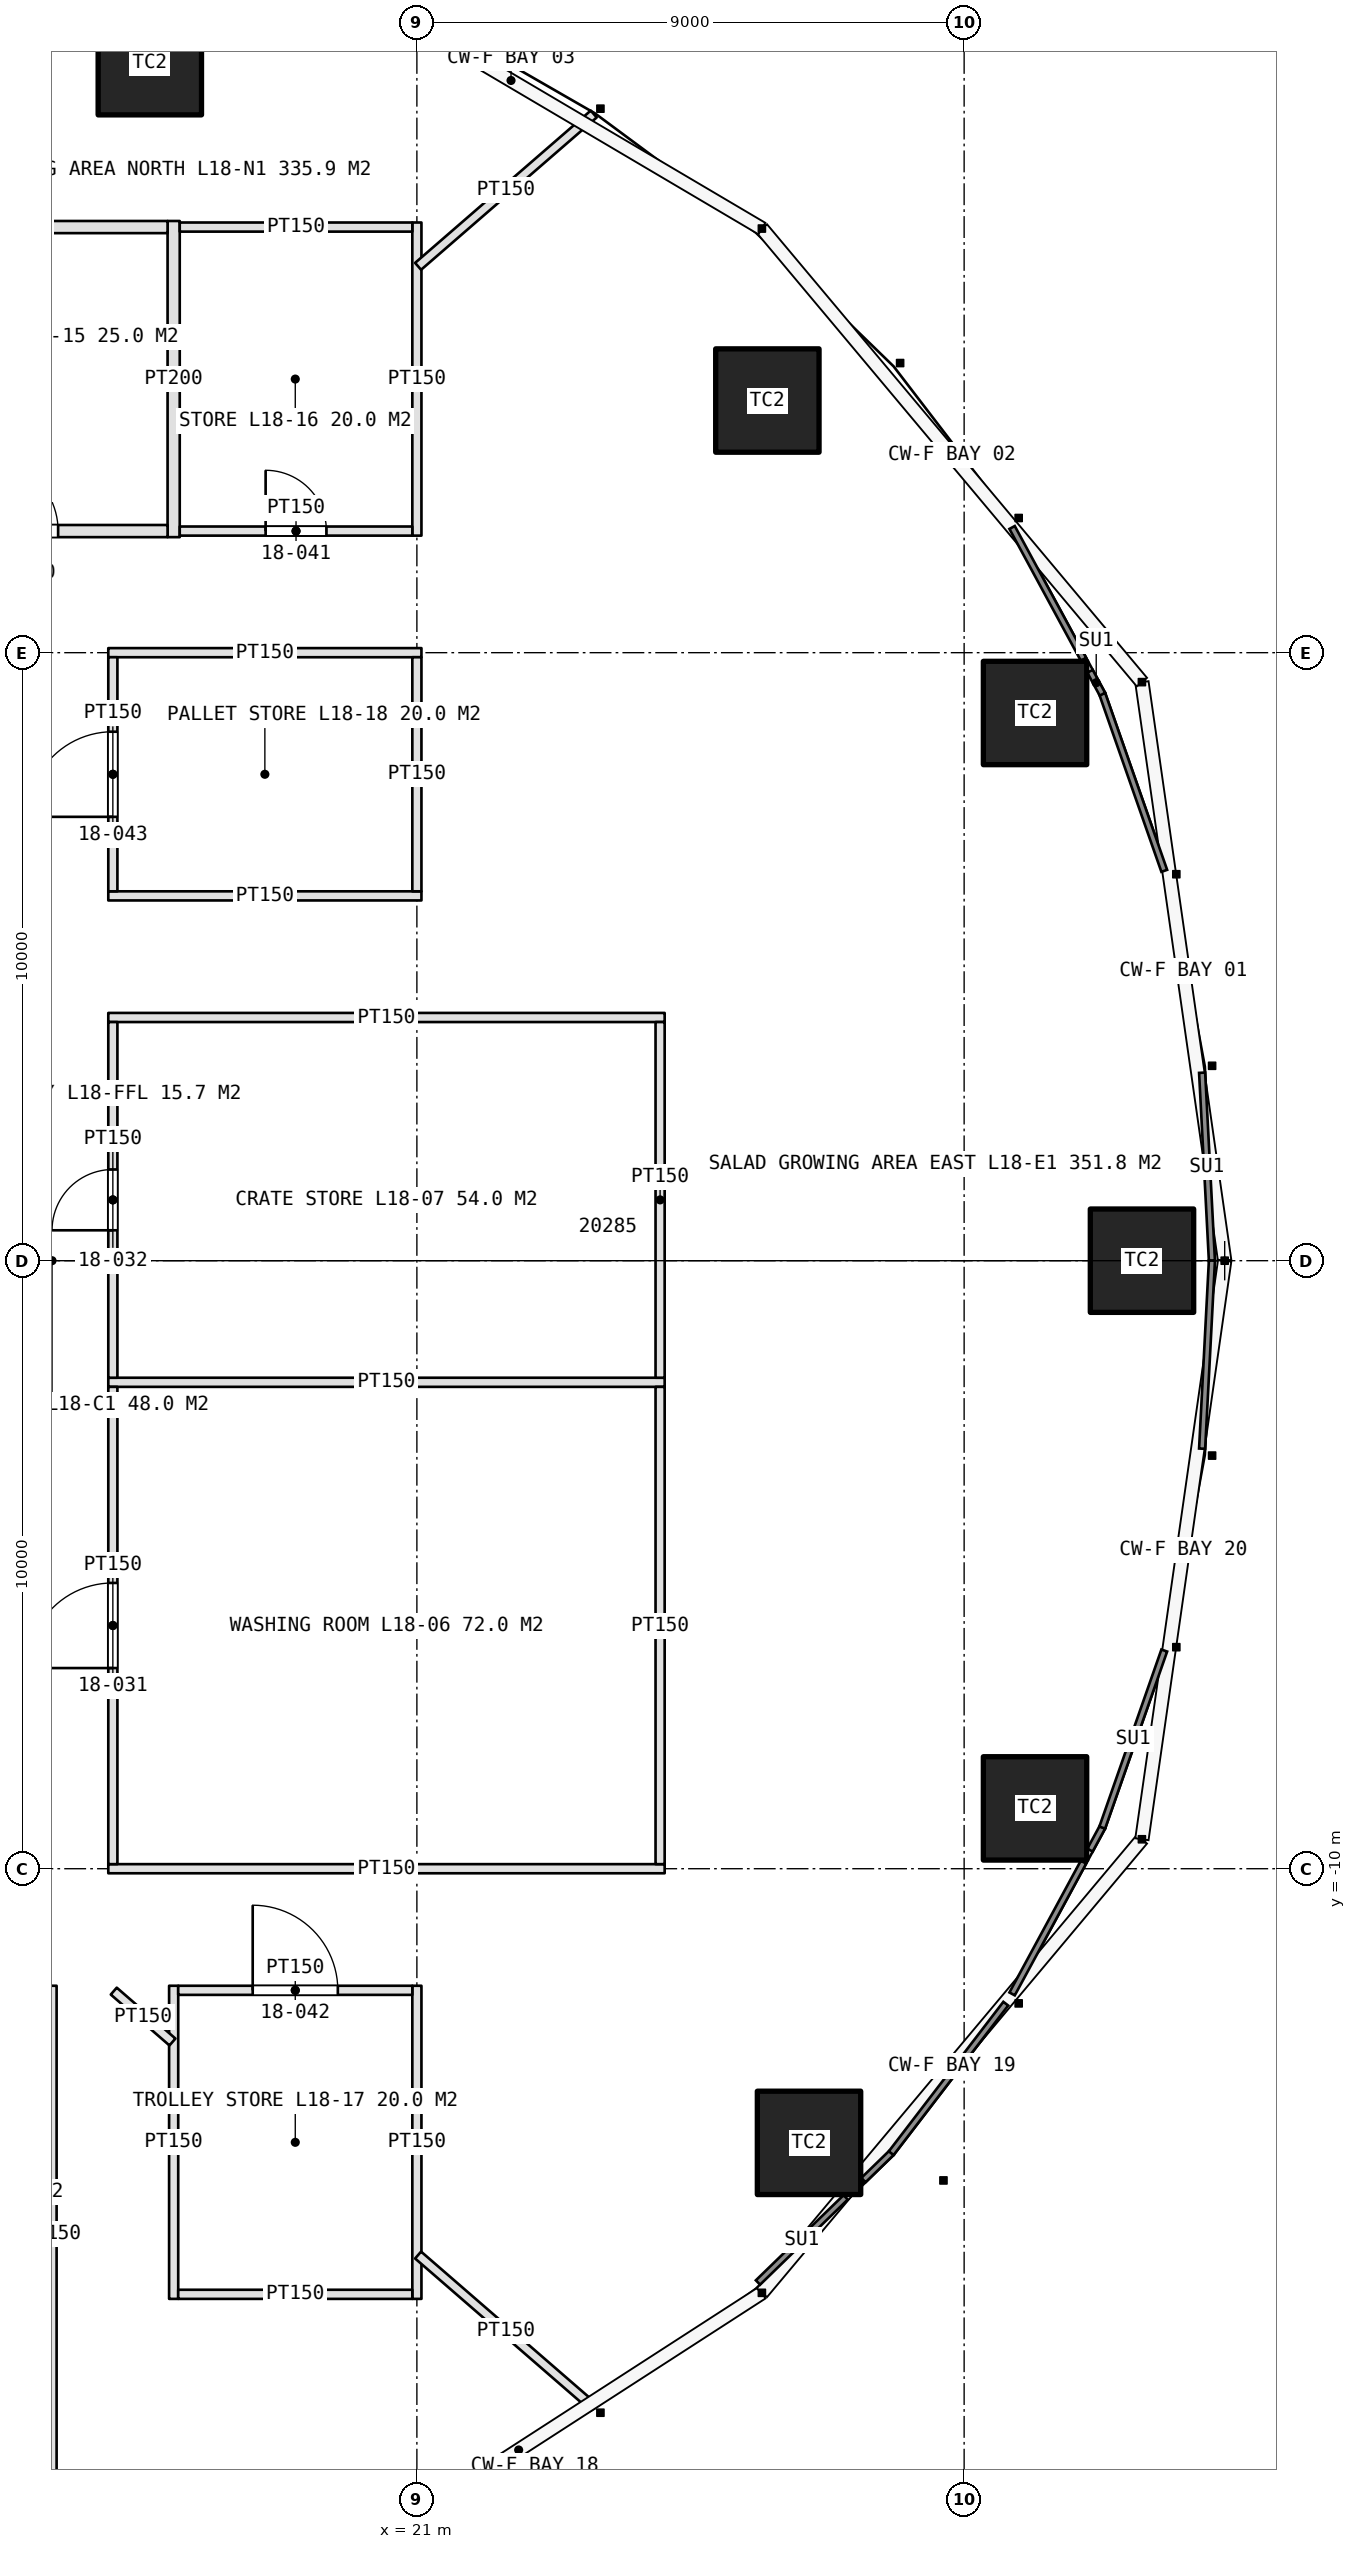
"""IFC4 building model, lengths in metres.
Left out: names, types, materials, properties, quantities, classifications, styles, units other than length and angle.
Written with IfcOpenShell. Run it as: python <this file> out.ifc"""

import sys

from ifc_helpers import new_model, si_unit, direction, frame, frame_2d, origin, origin_2d, place, context, subcontext, project, spatial, rectangle, extrude, element, fill, save


model = new_model("IFC4")
c1 = context("Model", 3, precision=1e-05, world=origin(), true_north=direction((0.0, 1.0)))
c2 = subcontext(c1, "Body", "Model", "MODEL_VIEW")
j1 = project(units=[si_unit("LENGTHUNIT", "METRE"), si_unit("PLANEANGLEUNIT", "RADIAN")], contexts=[c1])
p1 = place(None, origin())
s1 = spatial("IfcSite", under=j1, at=p1, CompositionType="ELEMENT")
p2 = place(p1, origin())
s2 = spatial("IfcBuilding", under=s1, at=p2, CompositionType="ELEMENT")
p3 = place(p2, frame((0.0, 0.0, 90.0)))
s3 = spatial("IfcBuildingStorey", under=s2, at=p3, CompositionType="ELEMENT", Elevation=90.0)
for number, where, z_axis, x_axis in (
    (1, (32.925, 0.0, 0.0), (0.0, 0.0, 1.0), (1.0, 0.0, 0.0)),
    (2, (31.166, 9.008, 0.0), (0.0, 0.0, 1.0), (1.0, 0.0, 0.0)),
    (3, (26.764, 14.147, 0.0), (0.0, 0.0, 1.0), (1.0, 0.0, 0.0)),
    (4, (16.608, 19.695, 0.0), (0.0, 0.0, 1.0), (1.0, 0.0, 0.0)),
    (5, (27.449, -14.509, 0.0), (0.0, 0.0, 1.0), (1.0, 0.0, 0.0)),
    (6, (31.166, -9.008, 0.0), (0.0, 0.0, 1.0), (1.0, 0.0, 0.0)),
):
    element("IfcColumn", number, at=place(p3, frame(where, z_axis=z_axis, x_axis=x_axis)), inside=s3, PredefinedType="COLUMN", context=c2, shape_type="SweptSolid", body=[
        extrude(rectangle(XDim=1.7, YDim=1.7, at=origin_2d()), origin(), (0.0, 0.0, 1.0), 5.0),
    ])
p4 = place(p3, frame((15.0, -11.925, 0.0), z_axis=(0.0, 0.0, 1.0), x_axis=(0.0, -1.0, 0.0)))
e7 = element("IfcWall", 7, at=p4, inside=s3, PredefinedType="PARTITIONING", context=c2, shape_type="SweptSolid", body=[
    extrude(rectangle(XDim=8.15, YDim=0.15, at=frame_2d((4.075, 0.0))), origin(), (0.0, 0.0, 1.0), 3.6),
])
for number, where, z_axis, x_axis in (
    (8, (15.925, -10.0, 0.0), (0.0, 0.0, 1.0), (1.0, 0.0, 0.0)),
    (9, (15.925, -2.0, 0.0), (0.0, 0.0, 1.0), (1.0, 0.0, 0.0)),
    (10, (15.925, 4.0, 0.0), (0.0, 0.0, 1.0), (1.0, 0.0, 0.0)),
):
    element("IfcWall", number, at=place(p3, frame(where, z_axis=z_axis, x_axis=x_axis)), inside=s3, PredefinedType="PARTITIONING", context=c2, shape_type="SweptSolid", body=[
        extrude(rectangle(XDim=9.15, YDim=0.15, at=frame_2d((4.575, 0.0))), origin(), (0.0, 0.0, 1.0), 3.6),
    ])
p5 = place(p3, frame((16.0, -9.925, 0.0), z_axis=(0.0, 0.0, 1.0), x_axis=(0.0, 1.0, 0.0)))
e11 = element("IfcWall", 11, at=p5, inside=s3, PredefinedType="PARTITIONING", context=c2, shape_type="SweptSolid", body=[
    extrude(rectangle(XDim=7.85, YDim=0.15, at=frame_2d((3.925, 0.0))), origin(), (0.0, 0.0, 1.0), 3.6),
])
p6 = place(p5, frame((3.225, 0.0, 0.0)))
e12 = element("IfcOpeningElement", 12, at=p6, cuts=e11, PredefinedType="OPENING", context=c2, shape_type="SweptSolid", body=[
    extrude(rectangle(XDim=1.4, YDim=2.4, at=frame_2d((0.7, 1.2))), frame((0.0, 0.085, 0.0), z_axis=(0.0, -1.0, 0.0), x_axis=(1.0, 0.0, 0.0)), (0.0, 0.0, 1.0), 0.17),
])
p7 = place(p3, frame((25.0, -9.925, 0.0), z_axis=(0.0, 0.0, 1.0), x_axis=(0.0, 1.0, 0.0)))
e13 = element("IfcWall", 13, at=p7, inside=s3, PredefinedType="PARTITIONING", context=c2, shape_type="SweptSolid", body=[
    extrude(rectangle(XDim=7.85, YDim=0.15, at=frame_2d((3.925, 0.0))), origin(), (0.0, 0.0, 1.0), 3.6),
])
p8 = place(p3, frame((16.0, -1.925, 0.0), z_axis=(0.0, 0.0, 1.0), x_axis=(0.0, 1.0, 0.0)))
e14 = element("IfcWall", 14, at=p8, inside=s3, PredefinedType="PARTITIONING", context=c2, shape_type="SweptSolid", body=[
    extrude(rectangle(XDim=5.85, YDim=0.15, at=frame_2d((2.925, 0.0))), origin(), (0.0, 0.0, 1.0), 3.6),
])
p9 = place(p8, frame((2.425, 0.0, 0.0)))
e15 = element("IfcOpeningElement", 15, at=p9, cuts=e14, PredefinedType="OPENING", context=c2, shape_type="SweptSolid", body=[
    extrude(rectangle(XDim=1.0, YDim=2.2, at=frame_2d((0.5, 1.1))), frame((0.0, 0.085, 0.0), z_axis=(0.0, -1.0, 0.0), x_axis=(1.0, 0.0, 0.0)), (0.0, 0.0, 1.0), 0.17),
])
p10 = place(p3, frame((25.0, -1.925, 0.0), z_axis=(0.0, 0.0, 1.0), x_axis=(0.0, 1.0, 0.0)))
e16 = element("IfcWall", 16, at=p10, inside=s3, PredefinedType="PARTITIONING", context=c2, shape_type="SweptSolid", body=[
    extrude(rectangle(XDim=5.85, YDim=0.15, at=frame_2d((2.925, 0.0))), origin(), (0.0, 0.0, 1.0), 3.6),
])
p11 = place(p3, frame((17.0, 11.9, 0.0), z_axis=(0.0, 0.0, 1.0), x_axis=(0.0, 1.0, 0.0)))
e17 = element("IfcWall", 17, at=p11, inside=s3, PredefinedType="PARTITIONING", context=c2, shape_type="SweptSolid", body=[
    extrude(rectangle(XDim=5.2, YDim=0.2, at=frame_2d((2.6, 0.0))), origin(), (0.0, 0.0, 1.0), 3.6),
])
p12 = place(p3, frame((21.0, 11.925, 0.0), z_axis=(0.0, 0.0, 1.0), x_axis=(0.0, 1.0, 0.0)))
e18 = element("IfcWall", 18, at=p12, inside=s3, PredefinedType="PARTITIONING", context=c2, shape_type="SweptSolid", body=[
    extrude(rectangle(XDim=5.15, YDim=0.15, at=frame_2d((2.575, 0.0))), origin(), (0.0, 0.0, 1.0), 3.6),
])
p13 = place(p3, frame((12.1, 12.0, 0.0), z_axis=(0.0, 0.0, 1.0), x_axis=(1.0, 0.0, 0.0)))
e19 = element("IfcWall", 19, at=p13, inside=s3, PredefinedType="PARTITIONING", context=c2, shape_type="SweptSolid", body=[
    extrude(rectangle(XDim=4.8, YDim=0.2, at=frame_2d((2.4, 0.0))), origin(), (0.0, 0.0, 1.0), 3.6),
])
p14 = place(p13, frame((1.8, 0.0, 0.0)))
e20 = element("IfcOpeningElement", 20, at=p14, cuts=e19, PredefinedType="OPENING", context=c2, shape_type="SweptSolid", body=[
    extrude(rectangle(XDim=1.2, YDim=2.4, at=frame_2d((0.6, 1.2))), frame((0.0, 0.11, 0.0), z_axis=(0.0, -1.0, 0.0), x_axis=(1.0, 0.0, 0.0)), (0.0, 0.0, 1.0), 0.22),
])
p15 = place(p3, frame((12.1, 17.0, 0.0), z_axis=(0.0, 0.0, 1.0), x_axis=(1.0, 0.0, 0.0)))
e21 = element("IfcWall", 21, at=p15, inside=s3, PredefinedType="PARTITIONING", context=c2, shape_type="SweptSolid", body=[
    extrude(rectangle(XDim=4.8, YDim=0.2, at=frame_2d((2.4, 0.0))), origin(), (0.0, 0.0, 1.0), 3.6),
])
p16 = place(p3, frame((17.1, 12.0, 0.0), z_axis=(0.0, 0.0, 1.0), x_axis=(1.0, 0.0, 0.0)))
e22 = element("IfcWall", 22, at=p16, inside=s3, PredefinedType="PARTITIONING", context=c2, shape_type="SweptSolid", body=[
    extrude(rectangle(XDim=3.825, YDim=0.15, at=frame_2d((1.913, 0.0))), origin(), (0.0, 0.0, 1.0), 3.6),
])
p17 = place(p16, frame((1.413, 0.0, 0.0)))
e23 = element("IfcOpeningElement", 23, at=p17, cuts=e22, PredefinedType="OPENING", context=c2, shape_type="SweptSolid", body=[
    extrude(rectangle(XDim=1.0, YDim=2.2, at=frame_2d((0.5, 1.1))), frame((0.0, 0.085, 0.0), z_axis=(0.0, -1.0, 0.0), x_axis=(1.0, 0.0, 0.0)), (0.0, 0.0, 1.0), 0.17),
])
p18 = place(p3, frame((17.1, 17.0, 0.0), z_axis=(0.0, 0.0, 1.0), x_axis=(1.0, 0.0, 0.0)))
e24 = element("IfcWall", 24, at=p18, inside=s3, PredefinedType="PARTITIONING", context=c2, shape_type="SweptSolid", body=[
    extrude(rectangle(XDim=3.825, YDim=0.15, at=frame_2d((1.913, 0.0))), origin(), (0.0, 0.0, 1.0), 3.6),
])
for number, where, z_axis, x_axis in (
    (25, (17.0, -11.925, 0.0), (0.0, 0.0, 1.0), (0.0, -1.0, 0.0)),
    (26, (21.0, -11.925, 0.0), (0.0, 0.0, 1.0), (0.0, -1.0, 0.0)),
):
    element("IfcWall", number, at=place(p3, frame(where, z_axis=z_axis, x_axis=x_axis)), inside=s3, PredefinedType="PARTITIONING", context=c2, shape_type="SweptSolid", body=[
        extrude(rectangle(XDim=5.15, YDim=0.15, at=frame_2d((2.575, 0.0))), origin(), (0.0, 0.0, 1.0), 3.6),
    ])
p19 = place(p3, frame((17.075, -12.0, 0.0), z_axis=(0.0, 0.0, 1.0), x_axis=(1.0, 0.0, 0.0)))
e27 = element("IfcWall", 27, at=p19, inside=s3, PredefinedType="PARTITIONING", context=c2, shape_type="SweptSolid", body=[
    extrude(rectangle(XDim=3.85, YDim=0.15, at=frame_2d((1.925, 0.0))), origin(), (0.0, 0.0, 1.0), 3.6),
])
p20 = place(p19, frame((1.225, 0.0, 0.0)))
e28 = element("IfcOpeningElement", 28, at=p20, cuts=e27, PredefinedType="OPENING", context=c2, shape_type="SweptSolid", body=[
    extrude(rectangle(XDim=1.4, YDim=2.4, at=frame_2d((0.7, 1.2))), frame((0.0, 0.085, 0.0), z_axis=(0.0, -1.0, 0.0), x_axis=(1.0, 0.0, 0.0)), (0.0, 0.0, 1.0), 0.17),
])
p21 = place(p3, frame((17.075, -17.0, 0.0), z_axis=(0.0, 0.0, 1.0), x_axis=(1.0, 0.0, 0.0)))
e29 = element("IfcWall", 29, at=p21, inside=s3, PredefinedType="PARTITIONING", context=c2, shape_type="SweptSolid", body=[
    extrude(rectangle(XDim=3.85, YDim=0.15, at=frame_2d((1.925, 0.0))), origin(), (0.0, 0.0, 1.0), 3.6),
])
for number, where, z_axis, x_axis in (
    (30, (15.925, 6.0, 0.0), (0.0, 0.0, 1.0), (1.0, 0.0, 0.0)),
    (31, (15.925, 10.0, 0.0), (0.0, 0.0, 1.0), (1.0, 0.0, 0.0)),
):
    element("IfcWall", number, at=place(p3, frame(where, z_axis=z_axis, x_axis=x_axis)), inside=s3, PredefinedType="PARTITIONING", context=c2, shape_type="SweptSolid", body=[
        extrude(rectangle(XDim=5.15, YDim=0.15, at=frame_2d((2.575, 0.0))), origin(), (0.0, 0.0, 1.0), 3.6),
    ])
p22 = place(p3, frame((16.0, 6.075, 0.0), z_axis=(0.0, 0.0, 1.0), x_axis=(0.0, 1.0, 0.0)))
e32 = element("IfcWall", 32, at=p22, inside=s3, PredefinedType="PARTITIONING", context=c2, shape_type="SweptSolid", body=[
    extrude(rectangle(XDim=3.85, YDim=0.15, at=frame_2d((1.925, 0.0))), origin(), (0.0, 0.0, 1.0), 3.6),
])
p23 = place(p22, frame((1.225, 0.0, 0.0)))
e33 = element("IfcOpeningElement", 33, at=p23, cuts=e32, PredefinedType="OPENING", context=c2, shape_type="SweptSolid", body=[
    extrude(rectangle(XDim=1.4, YDim=2.4, at=frame_2d((0.7, 1.2))), frame((0.0, 0.085, 0.0), z_axis=(0.0, -1.0, 0.0), x_axis=(1.0, 0.0, 0.0)), (0.0, 0.0, 1.0), 0.17),
])
p24 = place(p3, frame((21.0, 6.075, 0.0), z_axis=(0.0, 0.0, 1.0), x_axis=(0.0, 1.0, 0.0)))
e34 = element("IfcWall", 34, at=p24, inside=s3, PredefinedType="PARTITIONING", context=c2, shape_type="SweptSolid", body=[
    extrude(rectangle(XDim=3.85, YDim=0.15, at=frame_2d((1.925, 0.0))), origin(), (0.0, 0.0, 1.0), 3.6),
])
p25 = place(p3, frame((21.02, -16.354, 0.0), z_axis=(0.0, 0.0, 1.0), x_axis=(0.755425653008, -0.655234372402, 0.0)))
e35 = element("IfcWall", 35, at=p25, inside=s3, PredefinedType="PARTITIONING", context=c2, shape_type="SweptSolid", body=[
    extrude(rectangle(XDim=3.823, YDim=0.15, at=frame_2d((1.912, 0.0))), origin(), (0.0, 0.0, 1.0), 3.6),
])
p26 = place(p3, frame((16.015, -12.013, 0.0), z_axis=(0.0, 0.0, 1.0), x_axis=(0.755411512729, -0.655250674503, 0.0)))
e36 = element("IfcWall", 36, at=p26, inside=s3, PredefinedType="PARTITIONING", context=c2, shape_type="SweptSolid", body=[
    extrude(rectangle(XDim=1.277, YDim=0.15, at=frame_2d((0.639, 0.0))), origin(), (0.0, 0.0, 1.0), 3.6),
])
p27 = place(p3, frame((21.02, 16.354, 0.0), z_axis=(0.0, 0.0, 1.0), x_axis=(0.755425653008, 0.655234372402, 0.0)))
e37 = element("IfcWall", 37, at=p27, inside=s3, PredefinedType="PARTITIONING", context=c2, shape_type="SweptSolid", body=[
    extrude(rectangle(XDim=3.823, YDim=0.15, at=frame_2d((1.912, 0.0))), origin(), (0.0, 0.0, 1.0), 3.6),
])
p28 = place(p6, origin())
e38 = element("IfcDoor", 38, at=p28, inside=s3, OperationType="DOUBLE_DOOR_DOUBLE_SWING", PredefinedType="DOOR", context=c2, shape_type="SweptSolid", body=[
    extrude(rectangle(XDim=1.4, YDim=2.4, at=frame_2d((0.7, 1.2))), frame((0.0, 0.025, 0.0), z_axis=(0.0, -1.0, 0.0), x_axis=(1.0, 0.0, 0.0)), (0.0, 0.0, 1.0), 0.05),
])
fill(e12, e38)
p29 = place(p9, origin())
e39 = element("IfcDoor", 39, at=p29, inside=s3, OperationType="SINGLE_SWING_LEFT", PredefinedType="DOOR", context=c2, shape_type="SweptSolid", body=[
    extrude(rectangle(XDim=1.0, YDim=2.2, at=frame_2d((0.5, 1.1))), frame((0.0, 0.025, 0.0), z_axis=(0.0, -1.0, 0.0), x_axis=(1.0, 0.0, 0.0)), (0.0, 0.0, 1.0), 0.05),
])
fill(e15, e39)
p30 = place(p14, origin())
e40 = element("IfcDoor", 40, at=p30, inside=s3, OperationType="SINGLE_SWING_LEFT", PredefinedType="DOOR", context=c2, shape_type="SweptSolid", body=[
    extrude(rectangle(XDim=1.2, YDim=2.4, at=frame_2d((0.6, 1.2))), frame((0.0, 0.025, 0.0), z_axis=(0.0, -1.0, 0.0), x_axis=(1.0, 0.0, 0.0)), (0.0, 0.0, 1.0), 0.05),
])
fill(e20, e40)
p31 = place(p17, origin())
e41 = element("IfcDoor", 41, at=p31, inside=s3, OperationType="SINGLE_SWING_LEFT", PredefinedType="DOOR", context=c2, shape_type="SweptSolid", body=[
    extrude(rectangle(XDim=1.0, YDim=2.2, at=frame_2d((0.5, 1.1))), frame((0.0, 0.025, 0.0), z_axis=(0.0, -1.0, 0.0), x_axis=(1.0, 0.0, 0.0)), (0.0, 0.0, 1.0), 0.05),
])
fill(e23, e41)
p32 = place(p20, origin())
e42 = element("IfcDoor", 42, at=p32, inside=s3, OperationType="DOUBLE_DOOR_DOUBLE_SWING", PredefinedType="DOOR", context=c2, shape_type="SweptSolid", body=[
    extrude(rectangle(XDim=1.4, YDim=2.4, at=frame_2d((0.7, 1.2))), frame((0.0, 0.025, 0.0), z_axis=(0.0, -1.0, 0.0), x_axis=(1.0, 0.0, 0.0)), (0.0, 0.0, 1.0), 0.05),
])
fill(e28, e42)
p33 = place(p23, origin())
e43 = element("IfcDoor", 43, at=p33, inside=s3, OperationType="DOUBLE_DOOR_DOUBLE_SWING", PredefinedType="DOOR", context=c2, shape_type="SweptSolid", body=[
    extrude(rectangle(XDim=1.4, YDim=2.4, at=frame_2d((0.7, 1.2))), frame((0.0, 0.025, 0.0), z_axis=(0.0, -1.0, 0.0), x_axis=(1.0, 0.0, 0.0)), (0.0, 0.0, 1.0), 0.05),
])
fill(e33, e43)
save(model, sys.argv[1])
